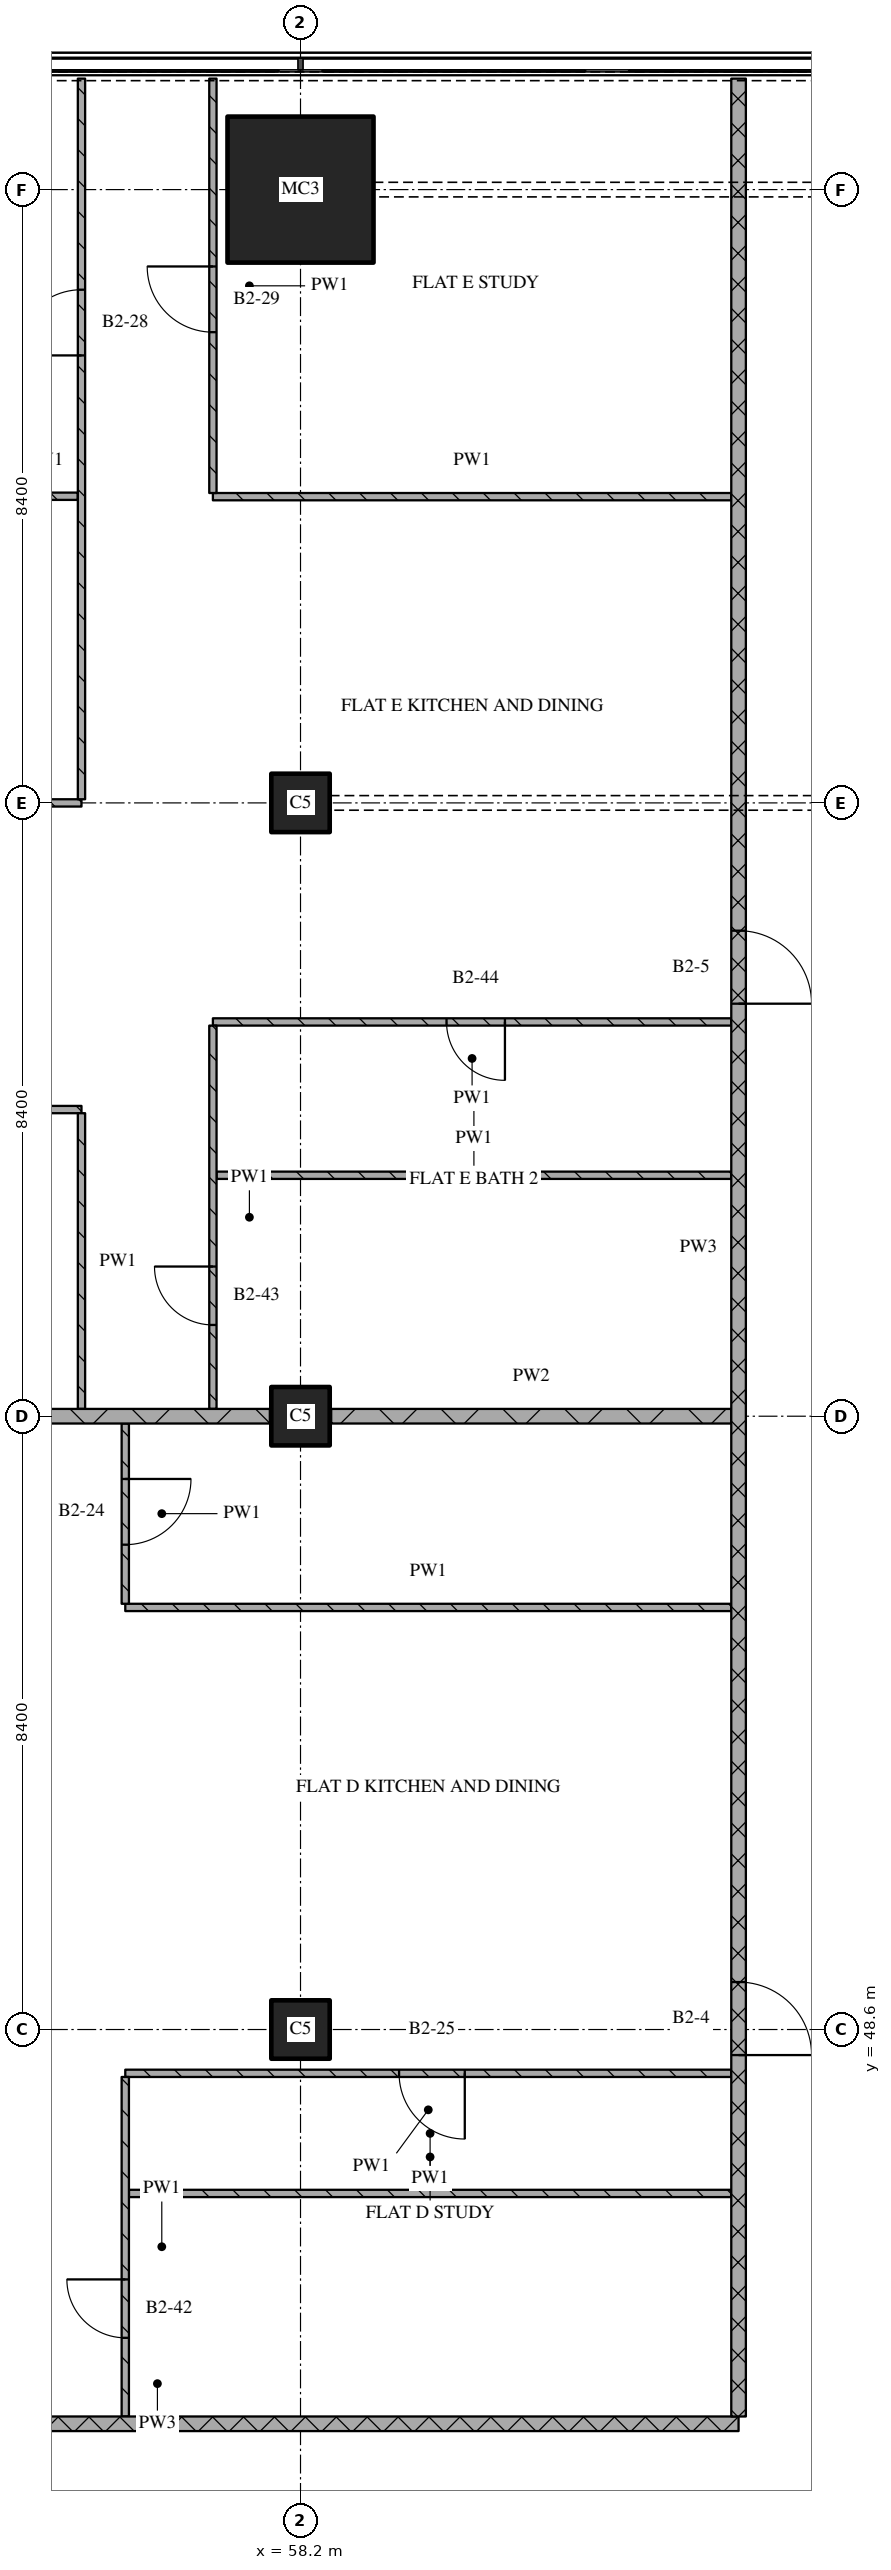
"""IFC4 building model, lengths in metres.
Left out: names, types, materials, properties, quantities, classifications, styles, units other than length and angle.
Written with IfcOpenShell. Run it as: python <this file> out.ifc"""

import sys

from ifc_helpers import new_model, si_unit, direction, frame, frame_2d, origin, origin_2d, place, context, subcontext, project, spatial, rectangle, extrude, element, fill, save


model = new_model("IFC4")
c1 = context("Model", 3, precision=1e-05, world=origin(), true_north=direction((0.0, 1.0)))
c2 = subcontext(c1, "Body", "Model", "MODEL_VIEW")
j1 = project(units=[si_unit("LENGTHUNIT", "METRE"), si_unit("PLANEANGLEUNIT", "RADIAN")], contexts=[c1])
p1 = place(None, origin())
s1 = spatial("IfcSite", under=j1, at=p1, CompositionType="ELEMENT")
p2 = place(p1, origin())
s2 = spatial("IfcBuilding", under=s1, at=p2, CompositionType="ELEMENT")
p3 = place(p2, frame((0.0, 0.0, 109.65)))
s3 = spatial("IfcBuildingStorey", under=s2, at=p3, CompositionType="ELEMENT", Elevation=109.65)
for number, where, z_axis, x_axis in (
    (1, (58.2, 48.6, 0.0), (0.0, 0.0, 1.0), (1.0, 0.0, 0.0)),
    (2, (58.2, 57.0, 0.0), (0.0, 0.0, 1.0), (1.0, 0.0, 0.0)),
    (3, (58.2, 65.4, 0.0), (0.0, 0.0, 1.0), (1.0, 0.0, 0.0)),
):
    element("IfcColumn", number, at=place(p3, frame(where, z_axis=z_axis, x_axis=x_axis)), inside=s3, PredefinedType="COLUMN", context=c2, shape_type="SweptSolid", body=[
        extrude(rectangle(XDim=0.8, YDim=0.8, at=origin_2d()), origin(), (0.0, 0.0, 1.0), 3.6),
    ])
p4 = place(p3, frame((58.2, 73.8, 0.0), z_axis=(0.0, 0.0, 1.0), x_axis=(1.0, 0.0, 0.0)))
e4 = element("IfcColumn", 4, at=p4, inside=s3, PredefinedType="COLUMN", context=c2, shape_type="SweptSolid", body=[
    extrude(rectangle(XDim=2.0, YDim=2.0, at=origin_2d()), origin(), (0.0, 0.0, 1.0), 3.6),
])
p5 = place(p3, frame((48.28, 43.2, 0.0), z_axis=(0.0, 0.0, 1.0), x_axis=(1.0, 0.0, 0.0)))
e5 = element("IfcWall", 5, at=p5, inside=s3, PredefinedType="PARTITIONING", context=c2, shape_type="SweptSolid", body=[
    extrude(rectangle(XDim=15.92, YDim=0.2, at=frame_2d((7.96, 0.0))), origin(), (0.0, 0.0, 1.0), 3.32),
])
p6 = place(p3, frame((55.85, 46.355, 0.0), z_axis=(0.0, 0.0, 1.0), x_axis=(1.0, 0.0, 0.0)))
e6 = element("IfcWall", 6, at=p6, inside=s3, PredefinedType="PARTITIONING", context=c2, shape_type="SweptSolid", body=[
    extrude(rectangle(XDim=8.25, YDim=0.1, at=frame_2d((4.125, 0.0))), origin(), (0.0, 0.0, 1.0), 3.32),
])
p7 = place(p3, frame((64.1, 48.0, 0.0), z_axis=(0.0, 0.0, 1.0), x_axis=(-1.0, 0.0, 0.0)))
e7 = element("IfcWall", 7, at=p7, inside=s3, PredefinedType="PARTITIONING", context=c2, shape_type="SweptSolid", body=[
    extrude(rectangle(XDim=8.3, YDim=0.1, at=frame_2d((4.15, 0.0))), origin(), (0.0, 0.0, 1.0), 3.32),
])
p8 = place(p7, frame((3.65, 0.0, 0.0)))
e8 = element("IfcOpeningElement", 8, at=p8, cuts=e7, PredefinedType="OPENING", context=c2, shape_type="SweptSolid", body=[
    extrude(rectangle(XDim=0.9, YDim=2.1, at=frame_2d((0.45, 1.05))), frame((0.0, 0.06, 0.0), z_axis=(0.0, -1.0, 0.0), x_axis=(1.0, 0.0, 0.0)), (0.0, 0.0, 1.0), 0.12),
])
p9 = place(p3, frame((55.8, 54.381, 0.0), z_axis=(0.0, 0.0, 1.0), x_axis=(1.0, 0.0, 0.0)))
e9 = element("IfcWall", 9, at=p9, inside=s3, PredefinedType="PARTITIONING", context=c2, shape_type="SweptSolid", body=[
    extrude(rectangle(XDim=8.3, YDim=0.1, at=frame_2d((4.15, 0.0))), origin(), (0.0, 0.0, 1.0), 3.32),
])
p10 = place(p3, frame((50.22, 57.0, 0.0), z_axis=(0.0, 0.0, 1.0), x_axis=(1.0, 0.0, 0.0)))
e10 = element("IfcWall", 10, at=p10, inside=s3, PredefinedType="PARTITIONING", context=c2, shape_type="SweptSolid", body=[
    extrude(rectangle(XDim=7.56, YDim=0.2, at=frame_2d((3.78, 0.0))), origin(), (0.0, 0.0, 1.0), 3.32),
])
p11 = place(p3, frame((58.62, 57.0, 0.0), z_axis=(0.0, 0.0, 1.0), x_axis=(1.0, 0.0, 0.0)))
e11 = element("IfcWall", 11, at=p11, inside=s3, PredefinedType="PARTITIONING", context=c2, shape_type="SweptSolid", body=[
    extrude(rectangle(XDim=5.48, YDim=0.2, at=frame_2d((2.74, 0.0))), origin(), (0.0, 0.0, 1.0), 3.32),
])
p12 = place(p3, frame((57.05, 60.3, 0.0), z_axis=(0.0, 0.0, 1.0), x_axis=(1.0, 0.0, 0.0)))
e12 = element("IfcWall", 12, at=p12, inside=s3, PredefinedType="PARTITIONING", context=c2, shape_type="SweptSolid", body=[
    extrude(rectangle(XDim=7.05, YDim=0.1, at=frame_2d((3.525, 0.0))), origin(), (0.0, 0.0, 1.0), 3.32),
])
p13 = place(p3, frame((55.2, 61.2, 0.0), z_axis=(0.0, 0.0, 1.0), x_axis=(-1.0, 0.0, 0.0)))
e13 = element("IfcWall", 13, at=p13, inside=s3, PredefinedType="PARTITIONING", context=c2, shape_type="SweptSolid", body=[
    extrude(rectangle(XDim=6.92, YDim=0.1, at=frame_2d((3.46, 0.0))), origin(), (0.0, 0.0, 1.0), 3.32),
])
p14 = place(p13, frame((3.15, 0.0, 0.0)))
e14 = element("IfcOpeningElement", 14, at=p14, cuts=e13, PredefinedType="OPENING", context=c2, shape_type="SweptSolid", body=[
    extrude(rectangle(XDim=0.9, YDim=2.1, at=frame_2d((0.45, 1.05))), frame((0.0, 0.06, 0.0), z_axis=(0.0, -1.0, 0.0), x_axis=(1.0, 0.0, 0.0)), (0.0, 0.0, 1.0), 0.12),
])
p15 = place(p3, frame((64.1, 62.4, 0.0), z_axis=(0.0, 0.0, 1.0), x_axis=(-1.0, 0.0, 0.0)))
e15 = element("IfcWall", 15, at=p15, inside=s3, PredefinedType="PARTITIONING", context=c2, shape_type="SweptSolid", body=[
    extrude(rectangle(XDim=7.1, YDim=0.1, at=frame_2d((3.55, 0.0))), origin(), (0.0, 0.0, 1.0), 3.32),
])
p16 = place(p15, frame((3.1, 0.0, 0.0)))
e16 = element("IfcOpeningElement", 16, at=p16, cuts=e15, PredefinedType="OPENING", context=c2, shape_type="SweptSolid", body=[
    extrude(rectangle(XDim=0.8, YDim=2.1, at=frame_2d((0.4, 1.05))), frame((0.0, 0.06, 0.0), z_axis=(0.0, -1.0, 0.0), x_axis=(1.0, 0.0, 0.0)), (0.0, 0.0, 1.0), 0.12),
])
p17 = place(p3, frame((50.82, 65.4, 0.0), z_axis=(0.0, 0.0, 1.0), x_axis=(1.0, 0.0, 0.0)))
e17 = element("IfcWall", 17, at=p17, inside=s3, PredefinedType="PARTITIONING", context=c2, shape_type="SweptSolid", body=[
    extrude(rectangle(XDim=4.38, YDim=0.1, at=frame_2d((2.19, 0.0))), origin(), (0.0, 0.0, 1.0), 3.32),
])
p18 = place(p17, frame((0.33, 0.0, 0.0)))
e18 = element("IfcOpeningElement", 18, at=p18, cuts=e17, PredefinedType="OPENING", context=c2, shape_type="SweptSolid", body=[
    extrude(rectangle(XDim=0.9, YDim=2.1, at=frame_2d((0.45, 1.05))), frame((0.0, 0.06, 0.0), z_axis=(0.0, -1.0, 0.0), x_axis=(1.0, 0.0, 0.0)), (0.0, 0.0, 1.0), 0.12),
])
p19 = place(p3, frame((57.0, 69.594, 0.0), z_axis=(0.0, 0.0, 1.0), x_axis=(1.0, 0.0, 0.0)))
e19 = element("IfcWall", 19, at=p19, inside=s3, PredefinedType="PARTITIONING", context=c2, shape_type="SweptSolid", body=[
    extrude(rectangle(XDim=7.1, YDim=0.1, at=frame_2d((3.55, 0.0))), origin(), (0.0, 0.0, 1.0), 3.32),
])
p20 = place(p3, frame((48.28, 69.6, 0.0), z_axis=(0.0, 0.0, 1.0), x_axis=(1.0, 0.0, 0.0)))
e20 = element("IfcWall", 20, at=p20, inside=s3, PredefinedType="PARTITIONING", context=c2, shape_type="SweptSolid", body=[
    extrude(rectangle(XDim=6.87, YDim=0.1, at=frame_2d((3.435, 0.0))), origin(), (0.0, 0.0, 1.0), 3.32),
])
p21 = place(p3, frame((55.2, 61.15, 0.0), z_axis=(0.0, 0.0, 1.0), x_axis=(0.0, -1.0, 0.0)))
e21 = element("IfcWall", 21, at=p21, inside=s3, PredefinedType="PARTITIONING", context=c2, shape_type="SweptSolid", body=[
    extrude(rectangle(XDim=4.05, YDim=0.1, at=frame_2d((2.025, 0.0))), origin(), (0.0, 0.0, 1.0), 3.32),
])
p22 = place(p3, frame((55.2, 65.45, 0.0), z_axis=(0.0, 0.0, 1.0), x_axis=(0.0, 1.0, 0.0)))
e22 = element("IfcWall", 22, at=p22, inside=s3, PredefinedType="PARTITIONING", context=c2, shape_type="SweptSolid", body=[
    extrude(rectangle(XDim=9.87, YDim=0.1, at=frame_2d((4.935, 0.0))), origin(), (0.0, 0.0, 1.0), 3.32),
])
p23 = place(p22, frame((6.079, 0.0, 0.0)))
e23 = element("IfcOpeningElement", 23, at=p23, cuts=e22, PredefinedType="OPENING", context=c2, shape_type="SweptSolid", body=[
    extrude(rectangle(XDim=0.9, YDim=2.1, at=frame_2d((0.45, 1.05))), frame((0.0, 0.06, 0.0), z_axis=(0.0, -1.0, 0.0), x_axis=(1.0, 0.0, 0.0)), (0.0, 0.0, 1.0), 0.12),
])
p24 = place(p3, frame((55.8, 47.95, 0.0), z_axis=(0.0, 0.0, 1.0), x_axis=(0.0, -1.0, 0.0)))
e24 = element("IfcWall", 24, at=p24, inside=s3, PredefinedType="PARTITIONING", context=c2, shape_type="SweptSolid", body=[
    extrude(rectangle(XDim=4.65, YDim=0.1, at=frame_2d((2.325, 0.0))), origin(), (0.0, 0.0, 1.0), 3.32),
])
p25 = place(p24, frame((2.773, 0.0, 0.0)))
e25 = element("IfcOpeningElement", 25, at=p25, cuts=e24, PredefinedType="OPENING", context=c2, shape_type="SweptSolid", body=[
    extrude(rectangle(XDim=0.8, YDim=2.1, at=frame_2d((0.4, 1.05))), frame((0.0, 0.06, 0.0), z_axis=(0.0, -1.0, 0.0), x_axis=(1.0, 0.0, 0.0)), (0.0, 0.0, 1.0), 0.12),
])
p26 = place(p3, frame((55.8, 56.9, 0.0), z_axis=(0.0, 0.0, 1.0), x_axis=(0.0, -1.0, 0.0)))
e26 = element("IfcWall", 26, at=p26, inside=s3, PredefinedType="PARTITIONING", context=c2, shape_type="SweptSolid", body=[
    extrude(rectangle(XDim=2.469, YDim=0.1, at=frame_2d((1.234, 0.0))), origin(), (0.0, 0.0, 1.0), 3.32),
])
p27 = place(p26, frame((0.76, 0.0, 0.0)))
e27 = element("IfcOpeningElement", 27, at=p27, cuts=e26, PredefinedType="OPENING", context=c2, shape_type="SweptSolid", body=[
    extrude(rectangle(XDim=0.9, YDim=2.1, at=frame_2d((0.45, 1.05))), frame((0.0, 0.06, 0.0), z_axis=(0.0, -1.0, 0.0), x_axis=(1.0, 0.0, 0.0)), (0.0, 0.0, 1.0), 0.12),
])
p28 = place(p3, frame((57.0, 62.35, 0.0), z_axis=(0.0, 0.0, 1.0), x_axis=(0.0, -1.0, 0.0)))
e28 = element("IfcWall", 28, at=p28, inside=s3, PredefinedType="PARTITIONING", context=c2, shape_type="SweptSolid", body=[
    extrude(rectangle(XDim=5.25, YDim=0.1, at=frame_2d((2.625, 0.0))), origin(), (0.0, 0.0, 1.0), 3.32),
])
p29 = place(p28, frame((3.3, 0.0, 0.0)))
e29 = element("IfcOpeningElement", 29, at=p29, cuts=e28, PredefinedType="OPENING", context=c2, shape_type="SweptSolid", body=[
    extrude(rectangle(XDim=0.8, YDim=2.1, at=frame_2d((0.4, 1.05))), frame((0.0, 0.06, 0.0), z_axis=(0.0, -1.0, 0.0), x_axis=(1.0, 0.0, 0.0)), (0.0, 0.0, 1.0), 0.12),
])
p30 = place(p3, frame((57.0, 75.32, 0.0), z_axis=(0.0, 0.0, 1.0), x_axis=(0.0, -1.0, 0.0)))
e30 = element("IfcWall", 30, at=p30, inside=s3, PredefinedType="PARTITIONING", context=c2, shape_type="SweptSolid", body=[
    extrude(rectangle(XDim=5.676, YDim=0.1, at=frame_2d((2.838, 0.0))), origin(), (0.0, 0.0, 1.0), 3.32),
])
p31 = place(p30, frame((2.573, 0.0, 0.0)))
e31 = element("IfcOpeningElement", 31, at=p31, cuts=e30, PredefinedType="OPENING", context=c2, shape_type="SweptSolid", body=[
    extrude(rectangle(XDim=0.9, YDim=2.1, at=frame_2d((0.45, 1.05))), frame((0.0, 0.06, 0.0), z_axis=(0.0, -1.0, 0.0), x_axis=(1.0, 0.0, 0.0)), (0.0, 0.0, 1.0), 0.12),
])
p32 = place(p3, frame((64.2, 43.3, 0.0), z_axis=(0.0, 0.0, 1.0), x_axis=(0.0, 1.0, 0.0)))
e32 = element("IfcWall", 32, at=p32, inside=s3, PredefinedType="PARTITIONING", context=c2, shape_type="SweptSolid", body=[
    extrude(rectangle(XDim=32.02, YDim=0.2, at=frame_2d((16.01, 0.0))), origin(), (0.0, 0.0, 1.0), 3.32),
])
p33 = place(p32, frame((4.95, 0.0, 0.0)))
e33 = element("IfcOpeningElement", 33, at=p33, cuts=e32, PredefinedType="OPENING", context=c2, shape_type="SweptSolid", body=[
    extrude(rectangle(XDim=1.0, YDim=2.1, at=frame_2d((0.5, 1.05))), frame((0.0, 0.11, 0.0), z_axis=(0.0, -1.0, 0.0), x_axis=(1.0, 0.0, 0.0)), (0.0, 0.0, 1.0), 0.22),
])
p34 = place(p32, frame((19.35, 0.0, 0.0)))
e34 = element("IfcOpeningElement", 34, at=p34, cuts=e32, PredefinedType="OPENING", context=c2, shape_type="SweptSolid", body=[
    extrude(rectangle(XDim=1.0, YDim=2.1, at=frame_2d((0.5, 1.05))), frame((0.0, 0.11, 0.0), z_axis=(0.0, -1.0, 0.0), x_axis=(1.0, 0.0, 0.0)), (0.0, 0.0, 1.0), 0.22),
])
p35 = place(p8, origin())
e35 = element("IfcDoor", 35, at=p35, inside=s3, OperationType="SINGLE_SWING_LEFT", PredefinedType="DOOR", context=c2, shape_type="SweptSolid", body=[
    extrude(rectangle(XDim=0.9, YDim=2.1, at=frame_2d((0.45, 1.05))), frame((0.0, 0.025, 0.0), z_axis=(0.0, -1.0, 0.0), x_axis=(1.0, 0.0, 0.0)), (0.0, 0.0, 1.0), 0.05),
])
fill(e8, e35)
p36 = place(p16, origin())
e36 = element("IfcDoor", 36, at=p36, inside=s3, OperationType="SINGLE_SWING_LEFT", PredefinedType="DOOR", context=c2, shape_type="SweptSolid", body=[
    extrude(rectangle(XDim=0.8, YDim=2.1, at=frame_2d((0.4, 1.05))), frame((0.0, 0.025, 0.0), z_axis=(0.0, -1.0, 0.0), x_axis=(1.0, 0.0, 0.0)), (0.0, 0.0, 1.0), 0.05),
])
fill(e16, e36)
p37 = place(p23, origin())
e37 = element("IfcDoor", 37, at=p37, inside=s3, OperationType="SINGLE_SWING_LEFT", PredefinedType="DOOR", context=c2, shape_type="SweptSolid", body=[
    extrude(rectangle(XDim=0.9, YDim=2.1, at=frame_2d((0.45, 1.05))), frame((0.0, 0.025, 0.0), z_axis=(0.0, -1.0, 0.0), x_axis=(1.0, 0.0, 0.0)), (0.0, 0.0, 1.0), 0.05),
])
fill(e23, e37)
p38 = place(p25, origin())
e38 = element("IfcDoor", 38, at=p38, inside=s3, OperationType="SINGLE_SWING_RIGHT", PredefinedType="DOOR", context=c2, shape_type="SweptSolid", body=[
    extrude(rectangle(XDim=0.8, YDim=2.1, at=frame_2d((0.4, 1.05))), frame((0.0, 0.025, 0.0), z_axis=(0.0, -1.0, 0.0), x_axis=(1.0, 0.0, 0.0)), (0.0, 0.0, 1.0), 0.05),
])
fill(e25, e38)
p39 = place(p27, origin())
e39 = element("IfcDoor", 39, at=p39, inside=s3, OperationType="SINGLE_SWING_LEFT", PredefinedType="DOOR", context=c2, shape_type="SweptSolid", body=[
    extrude(rectangle(XDim=0.9, YDim=2.1, at=frame_2d((0.45, 1.05))), frame((0.0, 0.025, 0.0), z_axis=(0.0, -1.0, 0.0), x_axis=(1.0, 0.0, 0.0)), (0.0, 0.0, 1.0), 0.05),
])
fill(e27, e39)
p40 = place(p29, origin())
e40 = element("IfcDoor", 40, at=p40, inside=s3, OperationType="SINGLE_SWING_RIGHT", PredefinedType="DOOR", context=c2, shape_type="SweptSolid", body=[
    extrude(rectangle(XDim=0.8, YDim=2.1, at=frame_2d((0.4, 1.05))), frame((0.0, 0.025, 0.0), z_axis=(0.0, -1.0, 0.0), x_axis=(1.0, 0.0, 0.0)), (0.0, 0.0, 1.0), 0.05),
])
fill(e29, e40)
p41 = place(p31, origin())
e41 = element("IfcDoor", 41, at=p41, inside=s3, OperationType="SINGLE_SWING_RIGHT", PredefinedType="DOOR", context=c2, shape_type="SweptSolid", body=[
    extrude(rectangle(XDim=0.9, YDim=2.1, at=frame_2d((0.45, 1.05))), frame((0.0, 0.025, 0.0), z_axis=(0.0, -1.0, 0.0), x_axis=(1.0, 0.0, 0.0)), (0.0, 0.0, 1.0), 0.05),
])
fill(e31, e41)
p42 = place(p33, origin())
e42 = element("IfcDoor", 42, at=p42, inside=s3, OperationType="SINGLE_SWING_RIGHT", PredefinedType="DOOR", context=c2, shape_type="SweptSolid", body=[
    extrude(rectangle(XDim=1.0, YDim=2.1, at=frame_2d((0.5, 1.05))), frame((0.0, 0.025, 0.0), z_axis=(0.0, -1.0, 0.0), x_axis=(1.0, 0.0, 0.0)), (0.0, 0.0, 1.0), 0.05),
])
fill(e33, e42)
p43 = place(p34, origin())
e43 = element("IfcDoor", 43, at=p43, inside=s3, OperationType="SINGLE_SWING_RIGHT", PredefinedType="DOOR", context=c2, shape_type="SweptSolid", body=[
    extrude(rectangle(XDim=1.0, YDim=2.1, at=frame_2d((0.5, 1.05))), frame((0.0, 0.025, 0.0), z_axis=(0.0, -1.0, 0.0), x_axis=(1.0, 0.0, 0.0)), (0.0, 0.0, 1.0), 0.05),
])
fill(e34, e43)
save(model, sys.argv[1])
